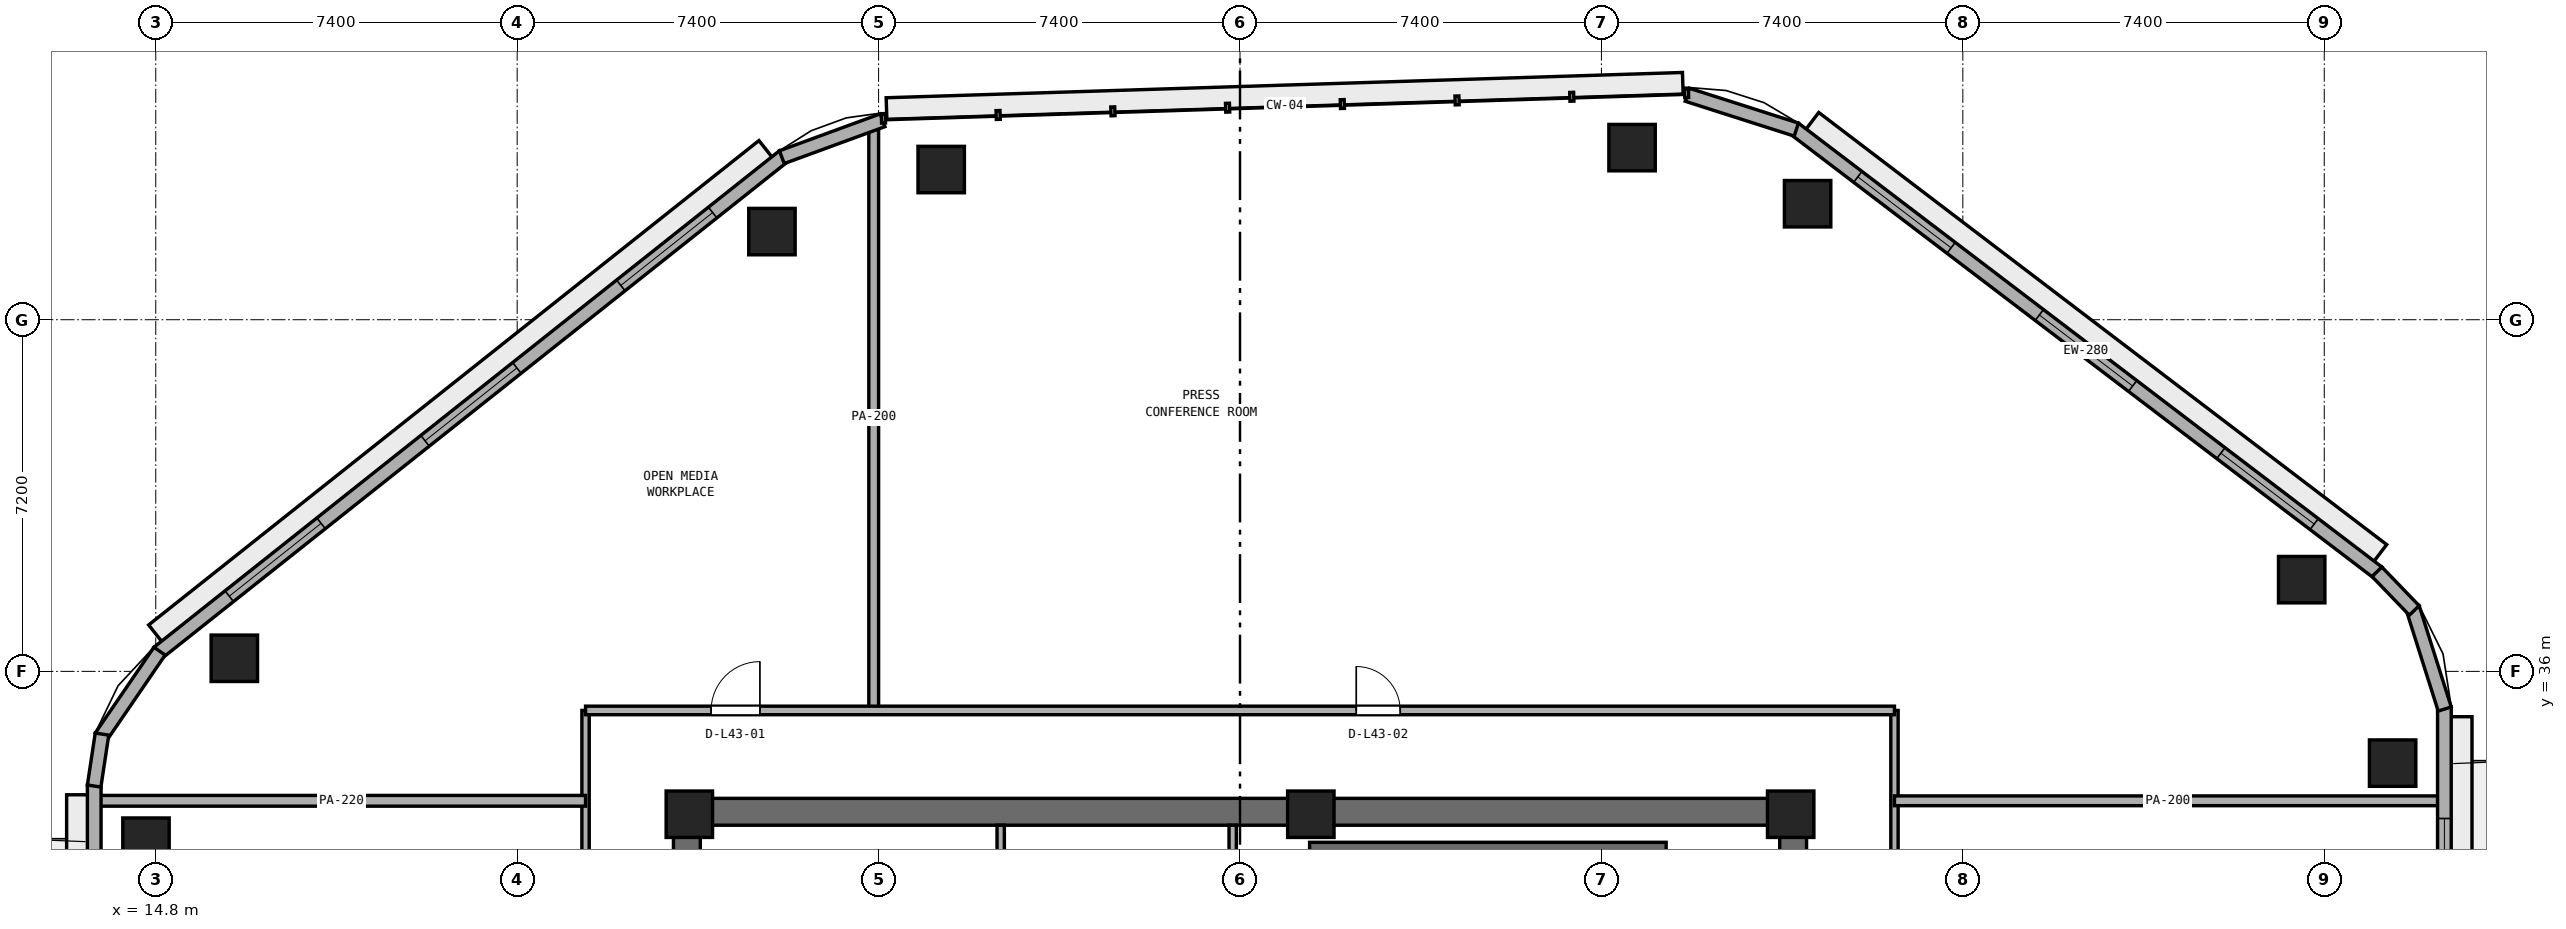
"""IFC4 building model, lengths in metres.
Left out: names, types, materials, properties, quantities, classifications, styles, units other than length and angle.
Written with IfcOpenShell. Run it as: python <this file> out.ifc"""

import sys

from ifc_helpers import new_model, si_unit, direction, frame, frame_2d, origin, origin_2d, place, context, subcontext, project, spatial, rectangle, extrude, element, fill, save


model = new_model("IFC4")
c1 = context("Model", 3, precision=1e-05, world=origin(), true_north=direction((0.0, 1.0)))
c2 = subcontext(c1, "Body", "Model", "MODEL_VIEW")
j1 = project(units=[si_unit("LENGTHUNIT", "METRE"), si_unit("PLANEANGLEUNIT", "RADIAN")], contexts=[c1])
p1 = place(None, origin())
s1 = spatial("IfcSite", under=j1, at=p1, CompositionType="ELEMENT")
p2 = place(p1, origin())
s2 = spatial("IfcBuilding", under=s1, at=p2, CompositionType="ELEMENT")
p3 = place(p2, frame((0.0, 0.0, 170.6)))
s3 = spatial("IfcBuildingStorey", under=s2, at=p3, CompositionType="ELEMENT", Elevation=170.6)
p4 = place(p3, frame((25.4, 33.125, 0.0), z_axis=(0.0, 0.0, 1.0), x_axis=(1.0, 0.0, 0.0)))
e1 = element("IfcWall", 1, at=p4, inside=s3, PredefinedType="SHEAR", context=c2, shape_type="SweptSolid", body=[
    extrude(rectangle(XDim=23.2, YDim=0.55, at=frame_2d((11.6, 0.0))), origin(), (0.0, 0.0, 1.0), 3.54),
])
p5 = place(p3, frame((25.675, 17.55, 0.0), z_axis=(0.0, 0.0, 1.0), x_axis=(0.0, 1.0, 0.0)))
e2 = element("IfcWall", 2, at=p5, inside=s3, PredefinedType="SHEAR", context=c2, shape_type="SweptSolid", body=[
    extrude(rectangle(XDim=15.3, YDim=0.55, at=frame_2d((7.65, 0.0))), origin(), (0.0, 0.0, 1.0), 3.54),
])
p6 = place(p5, frame((6.9, 0.0, 0.0)))
e3 = element("IfcOpeningElement", 3, at=p6, cuts=e2, PredefinedType="OPENING", context=c2, shape_type="SweptSolid", body=[
    extrude(rectangle(XDim=1.5, YDim=2.15, at=frame_2d((0.75, 1.075))), frame((0.0, 0.285, 0.0), z_axis=(0.0, -1.0, 0.0), x_axis=(1.0, 0.0, 0.0)), (0.0, 0.0, 1.0), 0.57),
])
p7 = place(p3, frame((48.325, 17.55, 0.0), z_axis=(0.0, 0.0, 1.0), x_axis=(0.0, 1.0, 0.0)))
e4 = element("IfcWall", 4, at=p7, inside=s3, PredefinedType="SHEAR", context=c2, shape_type="SweptSolid", body=[
    extrude(rectangle(XDim=15.3, YDim=0.55, at=frame_2d((7.65, 0.0))), origin(), (0.0, 0.0, 1.0), 3.54),
])
p8 = place(p7, frame((5.75, 0.0, 0.0)))
e5 = element("IfcOpeningElement", 5, at=p8, cuts=e4, PredefinedType="OPENING", context=c2, shape_type="SweptSolid", body=[
    extrude(rectangle(XDim=1.5, YDim=2.15, at=frame_2d((0.75, 1.075))), frame((0.0, 0.285, 0.0), z_axis=(0.0, -1.0, 0.0), x_axis=(1.0, 0.0, 0.0)), (0.0, 0.0, 1.0), 0.57),
])
for number, where, z_axis, x_axis in (
    (6, (48.275, 33.075, 0.0), (0.0, 0.0, 1.0), (1.0, 0.0, 0.0)),
    (7, (38.45, 33.075, 0.0), (0.0, 0.0, 1.0), (1.0, 0.0, 0.0)),
    (8, (25.725, 33.075, 0.0), (0.0, 0.0, 1.0), (1.0, 0.0, 0.0)),
):
    element("IfcColumn", number, at=place(p3, frame(where, z_axis=z_axis, x_axis=x_axis)), inside=s3, PredefinedType="PILASTER", context=c2, shape_type="SweptSolid", body=[
        extrude(rectangle(XDim=0.95, YDim=0.95, at=origin_2d()), origin(), (0.0, 0.0, 1.0), 3.8),
    ])
for number, where, z_axis, x_axis in (
    (9, (60.6, 34.122, 0.0), (0.0, 0.0, 1.0), (1.0, 0.0, 0.0)),
    (10, (58.738, 37.878, 0.0), (0.0, 0.0, 1.0), (1.0, 0.0, 0.0)),
    (11, (48.622, 45.575, 0.0), (0.0, 0.0, 1.0), (1.0, 0.0, 0.0)),
    (12, (45.028, 46.724, 0.0), (0.0, 0.0, 1.0), (1.0, 0.0, 0.0)),
    (13, (30.882, 46.275, 0.0), (0.0, 0.0, 1.0), (1.0, 0.0, 0.0)),
    (14, (27.416, 45.004, 0.0), (0.0, 0.0, 1.0), (1.0, 0.0, 0.0)),
    (15, (16.409, 36.268, 0.0), (0.0, 0.0, 1.0), (1.0, 0.0, 0.0)),
    (16, (14.6, 32.523, 0.0), (0.0, 0.0, 1.0), (1.0, 0.0, 0.0)),
):
    element("IfcColumn", number, at=place(p3, frame(where, z_axis=z_axis, x_axis=x_axis)), inside=s3, PredefinedType="COLUMN", context=c2, shape_type="SweptSolid", body=[
        extrude(rectangle(XDim=0.95, YDim=0.95, at=origin_2d()), origin(), (0.0, 0.0, 1.0), 3.8),
    ])
p9 = place(p3, frame((38.425, 32.375, 0.0), z_axis=(0.0, 0.0, 1.0), x_axis=(1.0, 0.0, 0.0)))
e17 = element("IfcWall", 17, at=p9, inside=s3, PredefinedType="SHEAR", context=c2, shape_type="SweptSolid", body=[
    extrude(rectangle(XDim=7.3, YDim=0.25, at=frame_2d((3.65, 0.0))), origin(), (0.0, 0.0, 1.0), 3.54),
])
for number, where, z_axis, x_axis in (
    (18, (32.1, 30.65, 0.0), (0.0, 0.0, 1.0), (0.0, 1.0, 0.0)),
    (19, (36.85, 30.65, 0.0), (0.0, 0.0, 1.0), (0.0, 1.0, 0.0)),
):
    element("IfcWall", number, at=place(p3, frame(where, z_axis=z_axis, x_axis=x_axis)), inside=s3, PredefinedType="PARTITIONING", context=c2, shape_type="SweptSolid", body=[
        extrude(rectangle(XDim=2.2, YDim=0.15, at=frame_2d((1.1, 0.0))), origin(), (0.0, 0.0, 1.0), 3.54),
    ])
p10 = place(p3, frame((50.4, 26.55, 0.0), z_axis=(0.0, 0.0, 1.0), x_axis=(0.0, 1.0, 0.0)))
e20 = element("IfcWall", 20, at=p10, inside=s3, PredefinedType="PARTITIONING", context=c2, shape_type="SweptSolid", body=[
    extrude(rectangle(XDim=8.65, YDim=0.15, at=frame_2d((4.325, 0.0))), origin(), (0.0, 0.0, 1.0), 3.54),
])
p11 = place(p10, frame((4.625, 0.0, 0.0)))
e21 = element("IfcOpeningElement", 21, at=p11, cuts=e20, PredefinedType="OPENING", context=c2, shape_type="SweptSolid", body=[
    extrude(rectangle(XDim=0.9, YDim=2.1, at=frame_2d((0.45, 1.05))), frame((0.0, 0.085, 0.0), z_axis=(0.0, -1.0, 0.0), x_axis=(1.0, 0.0, 0.0)), (0.0, 0.0, 1.0), 0.17),
])
p12 = place(p3, frame((29.5, 35.2, 0.0), z_axis=(0.0, 0.0, 1.0), x_axis=(0.0, 1.0, 0.0)))
e22 = element("IfcWall", 22, at=p12, inside=s3, PredefinedType="PARTITIONING", context=c2, shape_type="SweptSolid", body=[
    extrude(rectangle(XDim=12.006, YDim=0.2, at=frame_2d((6.003, 0.0))), origin(), (0.0, 0.0, 1.0), 3.54),
])
p13 = place(p3, frame((23.6, 26.55, 0.0), z_axis=(0.0, 0.0, 1.0), x_axis=(0.0, 1.0, 0.0)))
e23 = element("IfcWall", 23, at=p13, inside=s3, PredefinedType="PARTITIONING", context=c2, shape_type="SweptSolid", body=[
    extrude(rectangle(XDim=8.65, YDim=0.15, at=frame_2d((4.325, 0.0))), origin(), (0.0, 0.0, 1.0), 3.54),
])
p14 = place(p3, frame((13.605, 33.35, 0.0), z_axis=(0.0, 0.0, 1.0), x_axis=(1.0, 0.0, 0.0)))
e24 = element("IfcWall", 24, at=p14, inside=s3, PredefinedType="PARTITIONING", context=c2, shape_type="SweptSolid", body=[
    extrude(rectangle(XDim=9.995, YDim=0.22, at=frame_2d((4.998, 0.0))), origin(), (0.0, 0.0, 1.0), 3.54),
])
p15 = place(p3, frame((50.4, 33.35, 0.0), z_axis=(0.0, 0.0, 1.0), x_axis=(1.0, 0.0, 0.0)))
e25 = element("IfcWall", 25, at=p15, inside=s3, PredefinedType="PARTITIONING", context=c2, shape_type="SweptSolid", body=[
    extrude(rectangle(XDim=11.195, YDim=0.2, at=frame_2d((5.598, 0.0))), origin(), (0.0, 0.0, 1.0), 2.923),
])
p16 = place(p3, frame((23.6, 35.2, 0.0), z_axis=(0.0, 0.0, 1.0), x_axis=(1.0, 0.0, 0.0)))
e26 = element("IfcWall", 26, at=p16, inside=s3, PredefinedType="PARTITIONING", context=c2, shape_type="SweptSolid", body=[
    extrude(rectangle(XDim=26.8, YDim=0.175, at=frame_2d((13.4, 0.0))), origin(), (0.0, 0.0, 1.0), 3.54),
])
p17 = place(p16, frame((2.57, 0.0, 0.0)))
e27 = element("IfcOpeningElement", 27, at=p17, cuts=e26, PredefinedType="OPENING", context=c2, shape_type="SweptSolid", body=[
    extrude(rectangle(XDim=1.0, YDim=2.12, at=frame_2d((0.5, 1.06))), frame((0.0, 0.097, 0.0), z_axis=(0.0, -1.0, 0.0), x_axis=(1.0, 0.0, 0.0)), (0.0, 0.0, 1.0), 0.195),
])
p18 = place(p16, frame((15.78, 0.0, 0.0)))
e28 = element("IfcOpeningElement", 28, at=p18, cuts=e26, PredefinedType="OPENING", context=c2, shape_type="SweptSolid", body=[
    extrude(rectangle(XDim=0.9, YDim=2.1, at=frame_2d((0.45, 1.05))), frame((0.0, 0.097, 0.0), z_axis=(0.0, -1.0, 0.0), x_axis=(1.0, 0.0, 0.0)), (0.0, 0.0, 1.0), 0.195),
])
p19 = place(p3, frame((61.66, 16.369, 0.0), z_axis=(0.0, 0.0, 1.0), x_axis=(0.0, 1.0, 0.0)))
e29 = element("IfcWall", 29, at=p19, inside=s3, PredefinedType="STANDARD", context=c2, shape_type="SweptSolid", body=[
    extrude(rectangle(XDim=18.902, YDim=0.28, at=frame_2d((9.451, 0.0))), origin(), (0.0, 0.0, 1.0), 3.54),
])
p20 = place(p19, frame((8.601, 0.0, 0.0)))
e30 = element("IfcOpeningElement", 30, at=p20, cuts=e29, PredefinedType="OPENING", context=c2, shape_type="SweptSolid", body=[
    extrude(rectangle(XDim=1.1, YDim=2.2, at=frame_2d((0.55, 1.1))), frame((0.0, 0.15, 0.0), z_axis=(0.0, -1.0, 0.0), x_axis=(1.0, 0.0, 0.0)), (0.0, 0.0, 1.0), 0.3),
])
p21 = place(p19, frame((2.284, 0.0, 0.9)))
e31 = element("IfcOpeningElement", 31, at=p21, cuts=e29, PredefinedType="OPENING", context=c2, shape_type="SweptSolid", body=[
    extrude(rectangle(XDim=2.4, YDim=1.75, at=frame_2d((1.2, 0.875))), frame((0.0, 0.15, 0.0), z_axis=(0.0, -1.0, 0.0), x_axis=(1.0, 0.0, 0.0)), (0.0, 0.0, 1.0), 0.3),
])
p22 = place(p19, frame((14.219, 0.0, 0.9)))
e32 = element("IfcOpeningElement", 32, at=p22, cuts=e29, PredefinedType="OPENING", context=c2, shape_type="SweptSolid", body=[
    extrude(rectangle(XDim=2.4, YDim=1.75, at=frame_2d((1.2, 0.875))), frame((0.0, 0.15, 0.0), z_axis=(0.0, -1.0, 0.0), x_axis=(1.0, 0.0, 0.0)), (0.0, 0.0, 1.0), 0.3),
])
p23 = place(p3, frame((60.295, 38.025, 0.0), z_axis=(0.0, 0.0, 1.0), x_axis=(-0.795831760834, 0.605517801925, 0.0)))
e33 = element("IfcWall", 33, at=p23, inside=s3, PredefinedType="STANDARD", context=c2, shape_type="SweptSolid", body=[
    extrude(rectangle(XDim=15.012, YDim=0.28, at=frame_2d((7.506, 0.0))), origin(), (0.0, 0.0, 1.0), 3.54),
])
p24 = place(p23, frame((1.635, 0.0, 0.9)))
e34 = element("IfcOpeningElement", 34, at=p24, cuts=e33, PredefinedType="OPENING", context=c2, shape_type="SweptSolid", body=[
    extrude(rectangle(XDim=2.4, YDim=1.75, at=frame_2d((1.2, 0.875))), frame((0.0, 0.15, 0.0), z_axis=(0.0, -1.0, 0.0), x_axis=(1.0, 0.0, 0.0)), (0.0, 0.0, 1.0), 0.3),
])
p25 = place(p23, frame((6.306, 0.0, 0.9)))
e35 = element("IfcOpeningElement", 35, at=p25, cuts=e33, PredefinedType="OPENING", context=c2, shape_type="SweptSolid", body=[
    extrude(rectangle(XDim=2.4, YDim=1.75, at=frame_2d((1.2, 0.875))), frame((0.0, 0.15, 0.0), z_axis=(0.0, -1.0, 0.0), x_axis=(1.0, 0.0, 0.0)), (0.0, 0.0, 1.0), 0.3),
])
p26 = place(p23, frame((10.977, 0.0, 0.9)))
e36 = element("IfcOpeningElement", 36, at=p26, cuts=e33, PredefinedType="OPENING", context=c2, shape_type="SweptSolid", body=[
    extrude(rectangle(XDim=2.4, YDim=1.75, at=frame_2d((1.2, 0.875))), frame((0.0, 0.15, 0.0), z_axis=(0.0, -1.0, 0.0), x_axis=(1.0, 0.0, 0.0)), (0.0, 0.0, 1.0), 0.3),
])
p27 = place(p3, frame((27.658, 46.55, 0.0), z_axis=(0.0, 0.0, 1.0), x_axis=(-0.783266285861, -0.621686356158, 0.0)))
e37 = element("IfcWall", 37, at=p27, inside=s3, PredefinedType="STANDARD", context=c2, shape_type="SweptSolid", body=[
    extrude(rectangle(XDim=16.353, YDim=0.28, at=frame_2d((8.177, 0.0))), origin(), (0.0, 0.0, 1.0), 3.54),
])
p28 = place(p27, frame((1.859, 0.0, 0.9)))
e38 = element("IfcOpeningElement", 38, at=p28, cuts=e37, PredefinedType="OPENING", context=c2, shape_type="SweptSolid", body=[
    extrude(rectangle(XDim=2.4, YDim=1.75, at=frame_2d((1.2, 0.875))), frame((0.0, 0.15, 0.0), z_axis=(0.0, -1.0, 0.0), x_axis=(1.0, 0.0, 0.0)), (0.0, 0.0, 1.0), 0.3),
])
p29 = place(p27, frame((6.977, 0.0, 0.9)))
e39 = element("IfcOpeningElement", 39, at=p29, cuts=e37, PredefinedType="OPENING", context=c2, shape_type="SweptSolid", body=[
    extrude(rectangle(XDim=2.4, YDim=1.75, at=frame_2d((1.2, 0.875))), frame((0.0, 0.15, 0.0), z_axis=(0.0, -1.0, 0.0), x_axis=(1.0, 0.0, 0.0)), (0.0, 0.0, 1.0), 0.3),
])
p30 = place(p27, frame((12.094, 0.0, 0.9)))
e40 = element("IfcOpeningElement", 40, at=p30, cuts=e37, PredefinedType="OPENING", context=c2, shape_type="SweptSolid", body=[
    extrude(rectangle(XDim=2.4, YDim=1.75, at=frame_2d((1.2, 0.875))), frame((0.0, 0.15, 0.0), z_axis=(0.0, -1.0, 0.0), x_axis=(1.0, 0.0, 0.0)), (0.0, 0.0, 1.0), 0.3),
])
p31 = place(p3, frame((13.54, 33.673, 0.0), z_axis=(0.0, 0.0, 1.0), x_axis=(0.0, -1.0, 0.0)))
e41 = element("IfcWall", 41, at=p31, inside=s3, PredefinedType="STANDARD", context=c2, shape_type="SweptSolid", body=[
    extrude(rectangle(XDim=17.751, YDim=0.28, at=frame_2d((8.875, 0.0))), origin(), (0.0, 0.0, 1.0), 3.54),
])
p32 = place(p31, frame((8.326, 0.0, 0.0)))
e42 = element("IfcOpeningElement", 42, at=p32, cuts=e41, PredefinedType="OPENING", context=c2, shape_type="SweptSolid", body=[
    extrude(rectangle(XDim=1.1, YDim=2.2, at=frame_2d((0.55, 1.1))), frame((0.0, 0.15, 0.0), z_axis=(0.0, -1.0, 0.0), x_axis=(1.0, 0.0, 0.0)), (0.0, 0.0, 1.0), 0.3),
])
p33 = place(p31, frame((2.092, 0.0, 0.9)))
e43 = element("IfcOpeningElement", 43, at=p33, cuts=e41, PredefinedType="OPENING", context=c2, shape_type="SweptSolid", body=[
    extrude(rectangle(XDim=2.4, YDim=1.75, at=frame_2d((1.2, 0.875))), frame((0.0, 0.15, 0.0), z_axis=(0.0, -1.0, 0.0), x_axis=(1.0, 0.0, 0.0)), (0.0, 0.0, 1.0), 0.3),
])
p34 = place(p31, frame((13.26, 0.0, 0.9)))
e44 = element("IfcOpeningElement", 44, at=p34, cuts=e41, PredefinedType="OPENING", context=c2, shape_type="SweptSolid", body=[
    extrude(rectangle(XDim=2.4, YDim=1.75, at=frame_2d((1.2, 0.875))), frame((0.0, 0.15, 0.0), z_axis=(0.0, -1.0, 0.0), x_axis=(1.0, 0.0, 0.0)), (0.0, 0.0, 1.0), 0.3),
])
p35 = place(p3, frame((61.667, 35.229, 0.0), z_axis=(0.0, 0.0, 1.0), x_axis=(-0.302044777107, 0.953293738898, 0.0)))
e45 = element("IfcWall", 45, at=p35, inside=s3, PredefinedType="STANDARD", context=c2, shape_type="SweptSolid", body=[
    extrude(rectangle(XDim=2.174, YDim=0.28, at=frame_2d((1.087, 0.0))), origin(), (0.0, 0.0, 1.0), 3.54),
])
p36 = place(p3, frame((61.042, 37.247, 0.0), z_axis=(0.0, 0.0, 1.0), x_axis=(-0.694004126367, 0.719971022045, 0.0)))
e46 = element("IfcWall", 46, at=p36, inside=s3, PredefinedType="STANDARD", context=c2, shape_type="SweptSolid", body=[
    extrude(rectangle(XDim=1.1, YDim=0.28, at=frame_2d((0.55, 0.0))), origin(), (0.0, 0.0, 1.0), 3.54),
])
p37 = place(p3, frame((48.39, 47.093, 0.0), z_axis=(0.0, 0.0, 1.0), x_axis=(-0.952537789199, 0.304420367499, 0.0)))
e47 = element("IfcWall", 47, at=p37, inside=s3, PredefinedType="STANDARD", context=c2, shape_type="SweptSolid", body=[
    extrude(rectangle(XDim=2.344, YDim=0.28, at=frame_2d((1.172, 0.0))), origin(), (0.0, 0.0, 1.0), 3.54),
])
p38 = place(p3, frame((29.682, 47.284, 0.0), z_axis=(0.0, 0.0, 1.0), x_axis=(-0.938946936771, -0.344061985589, 0.0)))
e48 = element("IfcWall", 48, at=p38, inside=s3, PredefinedType="STANDARD", context=c2, shape_type="SweptSolid", body=[
    extrude(rectangle(XDim=2.197, YDim=0.28, at=frame_2d((1.098, 0.0))), origin(), (0.0, 0.0, 1.0), 3.54),
])
p39 = place(p3, frame((14.878, 36.414, 0.0), z_axis=(0.0, 0.0, 1.0), x_axis=(-0.564564614133, -0.825388875906, 0.0)))
e49 = element("IfcWall", 49, at=p39, inside=s3, PredefinedType="STANDARD", context=c2, shape_type="SweptSolid", body=[
    extrude(rectangle(XDim=2.128, YDim=0.28, at=frame_2d((1.064, 0.0))), origin(), (0.0, 0.0, 1.0), 3.54),
])
p40 = place(p3, frame((13.699, 34.716, 0.0), z_axis=(0.0, 0.0, 1.0), x_axis=(-0.149549920187, -0.988754176412, 0.0)))
e50 = element("IfcWall", 50, at=p40, inside=s3, PredefinedType="STANDARD", context=c2, shape_type="SweptSolid", body=[
    extrude(rectangle(XDim=1.076, YDim=0.28, at=frame_2d((0.538, 0.0))), origin(), (0.0, 0.0, 1.0), 3.54),
])
p41 = place(p17, origin())
e51 = element("IfcDoor", 51, at=p41, inside=s3, OperationType="SINGLE_SWING_RIGHT", PredefinedType="DOOR", context=c2, shape_type="SweptSolid", body=[
    extrude(rectangle(XDim=1.0, YDim=2.12, at=frame_2d((0.5, 1.06))), frame((0.0, 0.025, 0.0), z_axis=(0.0, -1.0, 0.0), x_axis=(1.0, 0.0, 0.0)), (0.0, 0.0, 1.0), 0.05),
])
fill(e27, e51)
p42 = place(p18, origin())
e52 = element("IfcDoor", 52, at=p42, inside=s3, OperationType="SINGLE_SWING_LEFT", PredefinedType="DOOR", context=c2, shape_type="SweptSolid", body=[
    extrude(rectangle(XDim=0.9, YDim=2.1, at=frame_2d((0.45, 1.05))), frame((0.0, 0.025, 0.0), z_axis=(0.0, -1.0, 0.0), x_axis=(1.0, 0.0, 0.0)), (0.0, 0.0, 1.0), 0.05),
])
fill(e28, e52)
p43 = place(p22, origin())
e53 = element("IfcWindow", 53, at=p43, inside=s3, PartitioningType="SINGLE_PANEL", PredefinedType="WINDOW", context=c2, shape_type="SweptSolid", body=[
    extrude(rectangle(XDim=2.4, YDim=1.75, at=frame_2d((1.2, 0.875))), frame((0.0, 0.03, 0.0), z_axis=(0.0, -1.0, 0.0), x_axis=(1.0, 0.0, 0.0)), (0.0, 0.0, 1.0), 0.06),
])
fill(e32, e53)
p44 = place(p24, origin())
e54 = element("IfcWindow", 54, at=p44, inside=s3, PartitioningType="SINGLE_PANEL", PredefinedType="WINDOW", context=c2, shape_type="SweptSolid", body=[
    extrude(rectangle(XDim=2.4, YDim=1.75, at=frame_2d((1.2, 0.875))), frame((0.0, 0.03, 0.0), z_axis=(0.0, -1.0, 0.0), x_axis=(1.0, 0.0, 0.0)), (0.0, 0.0, 1.0), 0.06),
])
fill(e34, e54)
p45 = place(p25, origin())
e55 = element("IfcWindow", 55, at=p45, inside=s3, PartitioningType="SINGLE_PANEL", PredefinedType="WINDOW", context=c2, shape_type="SweptSolid", body=[
    extrude(rectangle(XDim=2.4, YDim=1.75, at=frame_2d((1.2, 0.875))), frame((0.0, 0.03, 0.0), z_axis=(0.0, -1.0, 0.0), x_axis=(1.0, 0.0, 0.0)), (0.0, 0.0, 1.0), 0.06),
])
fill(e35, e55)
p46 = place(p26, origin())
e56 = element("IfcWindow", 56, at=p46, inside=s3, PartitioningType="SINGLE_PANEL", PredefinedType="WINDOW", context=c2, shape_type="SweptSolid", body=[
    extrude(rectangle(XDim=2.4, YDim=1.75, at=frame_2d((1.2, 0.875))), frame((0.0, 0.03, 0.0), z_axis=(0.0, -1.0, 0.0), x_axis=(1.0, 0.0, 0.0)), (0.0, 0.0, 1.0), 0.06),
])
fill(e36, e56)
p47 = place(p28, origin())
e57 = element("IfcWindow", 57, at=p47, inside=s3, PartitioningType="SINGLE_PANEL", PredefinedType="WINDOW", context=c2, shape_type="SweptSolid", body=[
    extrude(rectangle(XDim=2.4, YDim=1.75, at=frame_2d((1.2, 0.875))), frame((0.0, 0.03, 0.0), z_axis=(0.0, -1.0, 0.0), x_axis=(1.0, 0.0, 0.0)), (0.0, 0.0, 1.0), 0.06),
])
fill(e38, e57)
p48 = place(p29, origin())
e58 = element("IfcWindow", 58, at=p48, inside=s3, PartitioningType="SINGLE_PANEL", PredefinedType="WINDOW", context=c2, shape_type="SweptSolid", body=[
    extrude(rectangle(XDim=2.4, YDim=1.75, at=frame_2d((1.2, 0.875))), frame((0.0, 0.03, 0.0), z_axis=(0.0, -1.0, 0.0), x_axis=(1.0, 0.0, 0.0)), (0.0, 0.0, 1.0), 0.06),
])
fill(e39, e58)
p49 = place(p30, origin())
e59 = element("IfcWindow", 59, at=p49, inside=s3, PartitioningType="SINGLE_PANEL", PredefinedType="WINDOW", context=c2, shape_type="SweptSolid", body=[
    extrude(rectangle(XDim=2.4, YDim=1.75, at=frame_2d((1.2, 0.875))), frame((0.0, 0.03, 0.0), z_axis=(0.0, -1.0, 0.0), x_axis=(1.0, 0.0, 0.0)), (0.0, 0.0, 1.0), 0.06),
])
fill(e40, e59)
save(model, sys.argv[1])
